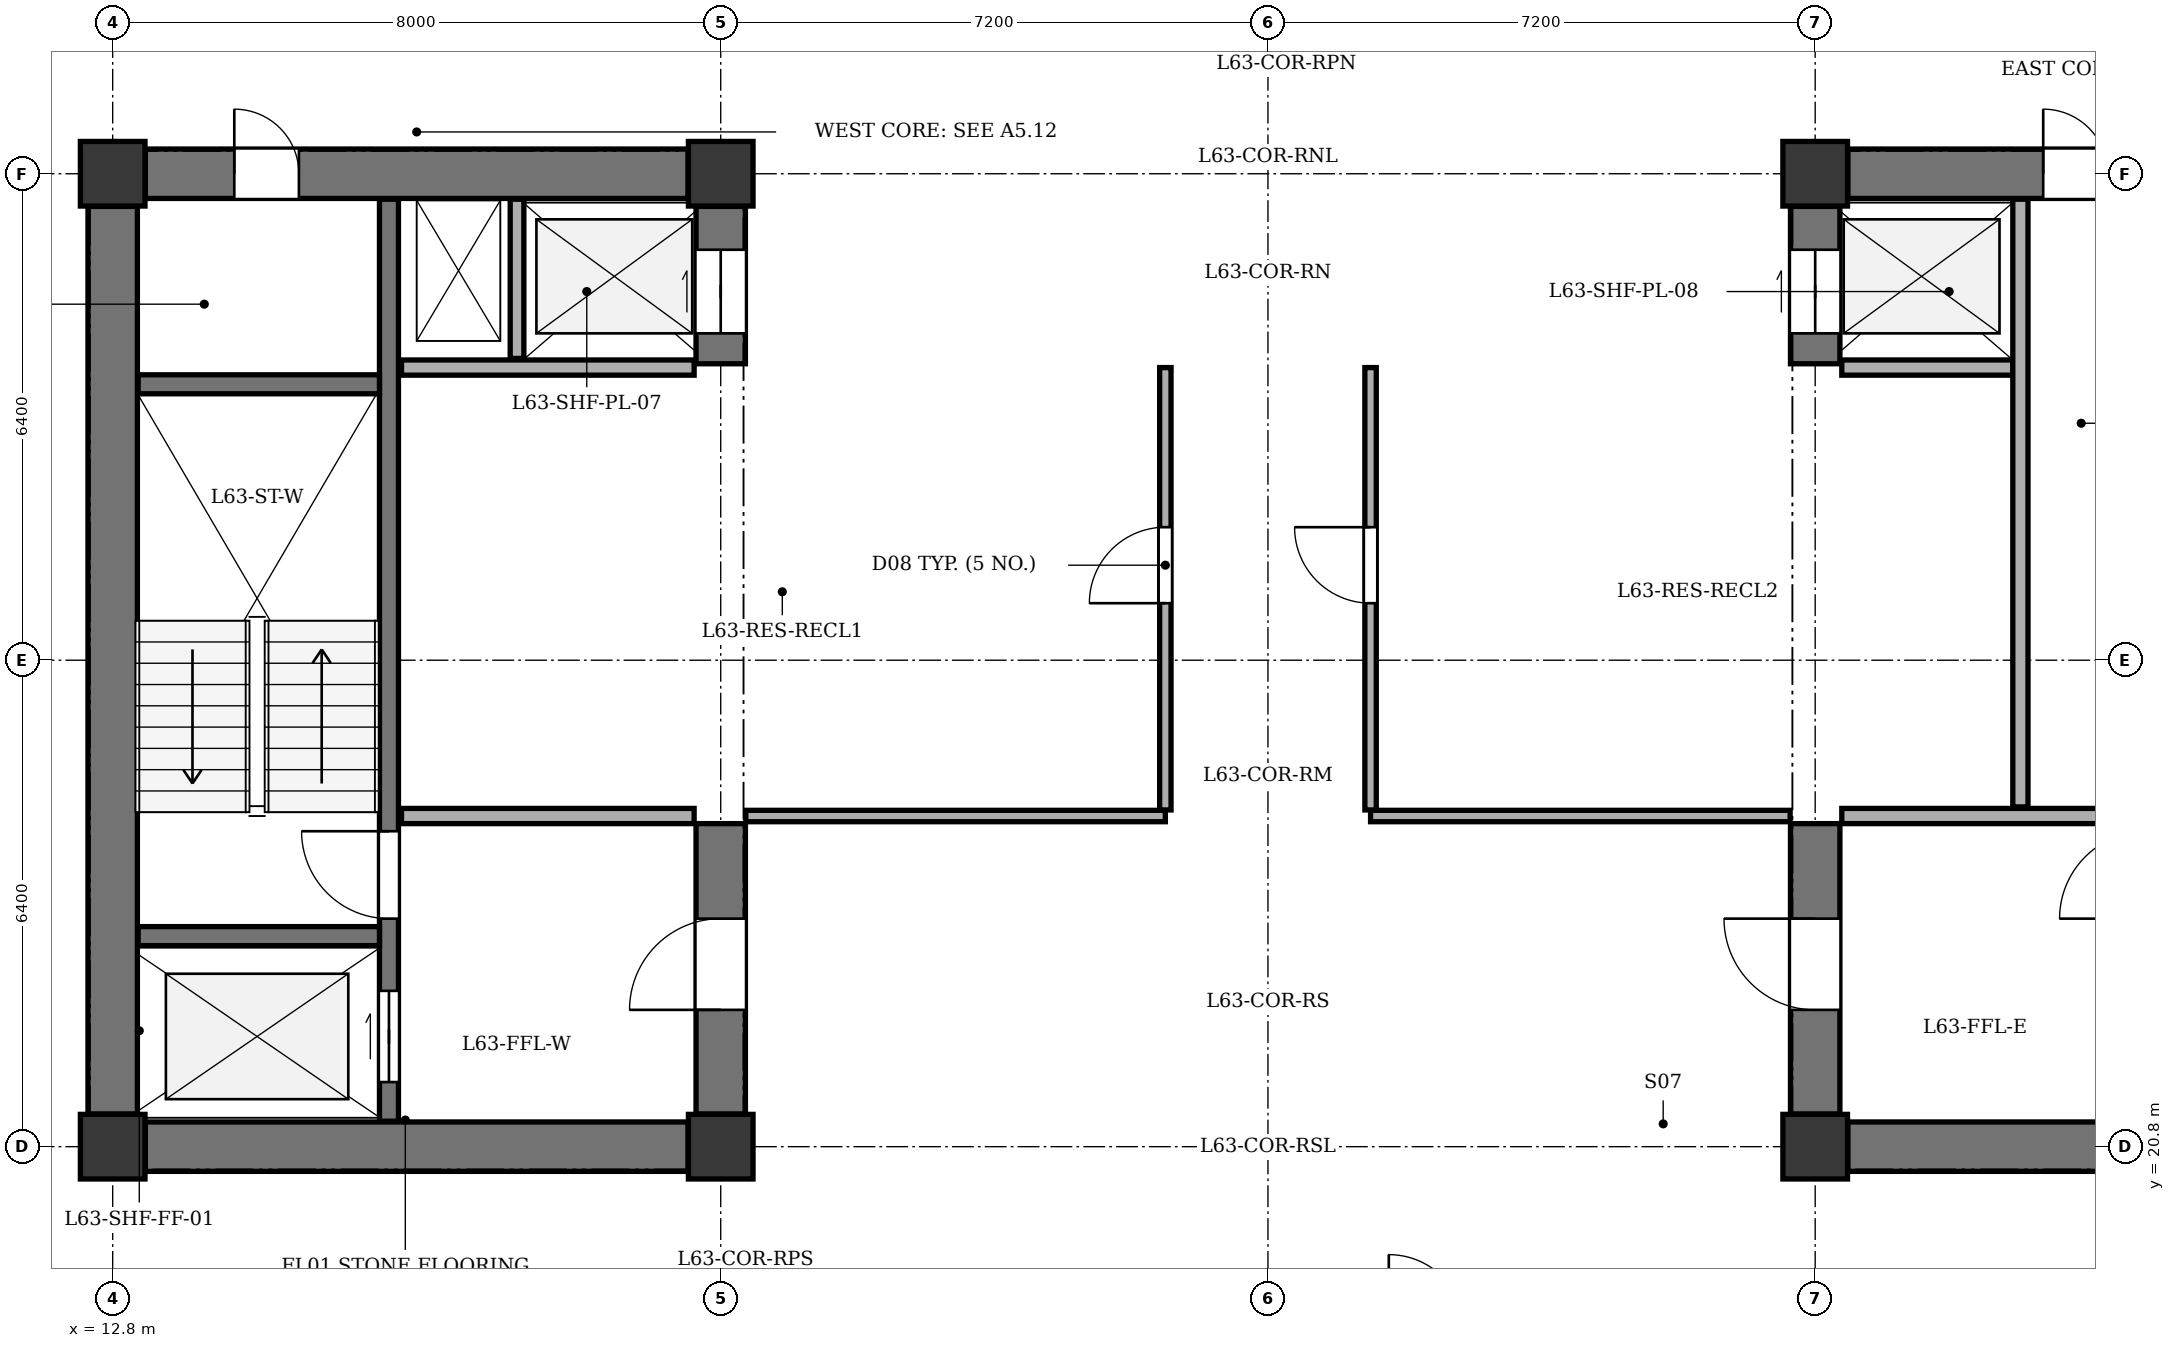
"""IFC4 building model, lengths in metres.
Left out: names, types, materials, properties, quantities, classifications, styles, units other than length and angle.
Written with IfcOpenShell. Run it as: python <this file> out.ifc"""

import sys

from ifc_helpers import new_model, si_unit, direction, frame, frame_2d, origin, origin_2d, place, context, subcontext, project, spatial, rectangle, extrude, element, fill, save


model = new_model("IFC4")
c1 = context("Model", 3, precision=1e-05, world=origin(), true_north=direction((0.0, 1.0)))
c2 = subcontext(c1, "Body", "Model", "MODEL_VIEW")
j1 = project(units=[si_unit("LENGTHUNIT", "METRE"), si_unit("PLANEANGLEUNIT", "RADIAN")], contexts=[c1])
p1 = place(None, origin())
s1 = spatial("IfcSite", under=j1, at=p1, CompositionType="ELEMENT")
p2 = place(p1, origin())
s2 = spatial("IfcBuilding", under=s1, at=p2, CompositionType="ELEMENT")
p3 = place(p2, frame((0.0, 0.0, 241.5)))
s3 = spatial("IfcBuildingStorey", under=s2, at=p3, CompositionType="ELEMENT", Elevation=241.5)
for number, where, z_axis, x_axis in (
    (1, (12.8, 20.8, 0.0), (0.0, 0.0, 1.0), (1.0, 0.0, 0.0)),
    (2, (20.8, 20.8, 0.0), (0.0, 0.0, 1.0), (1.0, 0.0, 0.0)),
    (3, (12.8, 33.6, 0.0), (0.0, 0.0, 1.0), (1.0, 0.0, 0.0)),
    (4, (20.8, 33.6, 0.0), (0.0, 0.0, 1.0), (1.0, 0.0, 0.0)),
    (5, (35.2, 20.8, 0.0), (0.0, 0.0, 1.0), (1.0, 0.0, 0.0)),
    (6, (35.2, 33.6, 0.0), (0.0, 0.0, 1.0), (1.0, 0.0, 0.0)),
):
    element("IfcColumn", number, at=place(p3, frame(where, z_axis=z_axis, x_axis=x_axis)), inside=s3, PredefinedType="COLUMN", context=c2, shape_type="SweptSolid", body=[
        extrude(rectangle(XDim=0.85, YDim=0.85, at=origin_2d()), origin(), (0.0, 0.0, 1.0), 3.4),
    ])
p4 = place(p3, frame((10.88, 35.0, 0.0), z_axis=(0.0, 0.0, 1.0), x_axis=(0.707106781187, 0.707106781187, 0.0)))
e7 = element("IfcWall", 7, at=p4, inside=s3, PredefinedType="STANDARD", context=c2, shape_type="SweptSolid", body=[
    extrude(rectangle(XDim=6.11, YDim=0.32, at=frame_2d((3.055, 0.0))), origin(), (0.0, 0.0, 1.0), 2.725),
])
p5 = place(p4, frame((2.355, 0.0, 0.75)))
e8 = element("IfcOpeningElement", 8, at=p5, cuts=e7, PredefinedType="OPENING", context=c2, shape_type="SweptSolid", body=[
    extrude(rectangle(XDim=1.4, YDim=1.65, at=frame_2d((0.7, 0.825))), frame((0.0, 0.17, 0.0), z_axis=(0.0, -1.0, 0.0), x_axis=(1.0, 0.0, 0.0)), (0.0, 0.0, 1.0), 0.34),
])
p6 = place(p3, frame((12.8, 21.23, 0.0), z_axis=(0.0, 0.0, 1.0), x_axis=(0.0, 1.0, 0.0)))
e9 = element("IfcWall", 9, at=p6, inside=s3, PredefinedType="SHEAR", context=c2, shape_type="SweptSolid", body=[
    extrude(rectangle(XDim=11.94, YDim=0.65, at=frame_2d((5.97, 0.0))), origin(), (0.0, 0.0, 1.0), 3.1),
])
p7 = place(p3, frame((13.23, 20.8, 0.0), z_axis=(0.0, 0.0, 1.0), x_axis=(1.0, 0.0, 0.0)))
e10 = element("IfcWall", 10, at=p7, inside=s3, PredefinedType="SHEAR", context=c2, shape_type="SweptSolid", body=[
    extrude(rectangle(XDim=7.14, YDim=0.65, at=frame_2d((3.57, 0.0))), origin(), (0.0, 0.0, 1.0), 3.1),
])
p8 = place(p3, frame((13.23, 33.6, 0.0), z_axis=(0.0, 0.0, 1.0), x_axis=(1.0, 0.0, 0.0)))
e11 = element("IfcWall", 11, at=p8, inside=s3, PredefinedType="SHEAR", context=c2, shape_type="SweptSolid", body=[
    extrude(rectangle(XDim=7.14, YDim=0.65, at=frame_2d((3.57, 0.0))), origin(), (0.0, 0.0, 1.0), 3.1),
])
p9 = place(p8, frame((1.17, 0.0, 0.0)))
e12 = element("IfcOpeningElement", 12, at=p9, cuts=e11, PredefinedType="OPENING", context=c2, shape_type="SweptSolid", body=[
    extrude(rectangle(XDim=0.85, YDim=2.02, at=frame_2d((0.425, 1.01))), frame((0.0, 0.335, 0.0), z_axis=(0.0, -1.0, 0.0), x_axis=(1.0, 0.0, 0.0)), (0.0, 0.0, 1.0), 0.67),
])
p10 = place(p3, frame((20.8, 21.23, 0.0), z_axis=(0.0, 0.0, 1.0), x_axis=(0.0, 1.0, 0.0)))
e13 = element("IfcWall", 13, at=p10, inside=s3, PredefinedType="SHEAR", context=c2, shape_type="SweptSolid", body=[
    extrude(rectangle(XDim=3.82, YDim=0.65, at=frame_2d((1.91, 0.0))), origin(), (0.0, 0.0, 1.0), 3.1),
])
p11 = place(p10, frame((1.37, 0.0, 0.0)))
e14 = element("IfcOpeningElement", 14, at=p11, cuts=e13, PredefinedType="OPENING", context=c2, shape_type="SweptSolid", body=[
    extrude(rectangle(XDim=1.2, YDim=2.15, at=frame_2d((0.6, 1.075))), frame((0.0, 0.335, 0.0), z_axis=(0.0, -1.0, 0.0), x_axis=(1.0, 0.0, 0.0)), (0.0, 0.0, 1.0), 0.67),
])
p12 = place(p3, frame((20.8, 31.1, 0.0), z_axis=(0.0, 0.0, 1.0), x_axis=(0.0, 1.0, 0.0)))
e15 = element("IfcWall", 15, at=p12, inside=s3, PredefinedType="SHEAR", context=c2, shape_type="SweptSolid", body=[
    extrude(rectangle(XDim=2.07, YDim=0.65, at=frame_2d((1.035, 0.0))), origin(), (0.0, 0.0, 1.0), 3.1),
])
p13 = place(p12, frame((0.4, 0.0, 0.0)))
e16 = element("IfcOpeningElement", 16, at=p13, cuts=e15, PredefinedType="OPENING", context=c2, shape_type="SweptSolid", body=[
    extrude(rectangle(XDim=1.1, YDim=2.1, at=frame_2d((0.55, 1.05))), frame((0.0, 0.335, 0.0), z_axis=(0.0, -1.0, 0.0), x_axis=(1.0, 0.0, 0.0)), (0.0, 0.0, 1.0), 0.67),
])
p14 = place(p3, frame((16.435, 21.135, 0.0), z_axis=(0.0, 0.0, 1.0), x_axis=(0.0, 1.0, 0.0)))
e17 = element("IfcWall", 17, at=p14, inside=s3, PredefinedType="SHEAR", context=c2, shape_type="SweptSolid", body=[
    extrude(rectangle(XDim=12.13, YDim=0.25, at=frame_2d((6.065, 0.0))), origin(), (0.0, 0.0, 1.0), 3.1),
])
p15 = place(p14, frame((0.515, 0.0, 0.0)))
e18 = element("IfcOpeningElement", 18, at=p15, cuts=e17, PredefinedType="OPENING", context=c2, shape_type="SweptSolid", body=[
    extrude(rectangle(XDim=1.2, YDim=2.15, at=frame_2d((0.6, 1.075))), frame((0.0, 0.135, 0.0), z_axis=(0.0, -1.0, 0.0), x_axis=(1.0, 0.0, 0.0)), (0.0, 0.0, 1.0), 0.27),
])
p16 = place(p14, frame((2.665, 0.0, 0.0)))
e19 = element("IfcOpeningElement", 19, at=p16, cuts=e17, PredefinedType="OPENING", context=c2, shape_type="SweptSolid", body=[
    extrude(rectangle(XDim=1.15, YDim=2.15, at=frame_2d((0.575, 1.075))), frame((0.0, 0.135, 0.0), z_axis=(0.0, -1.0, 0.0), x_axis=(1.0, 0.0, 0.0)), (0.0, 0.0, 1.0), 0.27),
])
for number, where, z_axis, x_axis in (
    (20, (13.135, 23.57, 0.0), (0.0, 0.0, 1.0), (1.0, 0.0, 0.0)),
    (21, (13.135, 30.83, 0.0), (0.0, 0.0, 1.0), (1.0, 0.0, 0.0)),
):
    element("IfcWall", number, at=place(p3, frame(where, z_axis=z_axis, x_axis=x_axis)), inside=s3, PredefinedType="SHEAR", context=c2, shape_type="SweptSolid", body=[
        extrude(rectangle(XDim=3.175, YDim=0.25, at=frame_2d((1.587, 0.0))), origin(), (0.0, 0.0, 1.0), 3.1),
    ])
for number, where, z_axis, x_axis in (
    (22, (16.6, 25.15, 0.0), (0.0, 0.0, 1.0), (1.0, 0.0, 0.0)),
    (23, (16.6, 31.05, 0.0), (0.0, 0.0, 1.0), (1.0, 0.0, 0.0)),
):
    element("IfcWall", number, at=place(p3, frame(where, z_axis=z_axis, x_axis=x_axis)), inside=s3, PredefinedType="SOLIDWALL", context=c2, shape_type="SweptSolid", body=[
        extrude(rectangle(XDim=3.85, YDim=0.2, at=frame_2d((1.925, 0.0))), origin(), (0.0, 0.0, 1.0), 3.1),
    ])
p17 = place(p3, frame((18.12, 31.17, 0.0), z_axis=(0.0, 0.0, 1.0), x_axis=(0.0, 1.0, 0.0)))
e24 = element("IfcWall", 24, at=p17, inside=s3, PredefinedType="PARTITIONING", context=c2, shape_type="SweptSolid", body=[
    extrude(rectangle(XDim=2.095, YDim=0.18, at=frame_2d((1.047, 0.0))), origin(), (0.0, 0.0, 1.0), 3.1),
])
p18 = place(p3, frame((35.63, 20.8, 0.0), z_axis=(0.0, 0.0, 1.0), x_axis=(1.0, 0.0, 0.0)))
e25 = element("IfcWall", 25, at=p18, inside=s3, PredefinedType="SHEAR", context=c2, shape_type="SweptSolid", body=[
    extrude(rectangle(XDim=7.14, YDim=0.65, at=frame_2d((3.57, 0.0))), origin(), (0.0, 0.0, 1.0), 3.1),
])
p19 = place(p3, frame((35.63, 33.6, 0.0), z_axis=(0.0, 0.0, 1.0), x_axis=(1.0, 0.0, 0.0)))
e26 = element("IfcWall", 26, at=p19, inside=s3, PredefinedType="SHEAR", context=c2, shape_type="SweptSolid", body=[
    extrude(rectangle(XDim=7.14, YDim=0.65, at=frame_2d((3.57, 0.0))), origin(), (0.0, 0.0, 1.0), 3.1),
])
p20 = place(p19, frame((4.77, 0.0, 0.0)))
e27 = element("IfcOpeningElement", 27, at=p20, cuts=e26, PredefinedType="OPENING", context=c2, shape_type="SweptSolid", body=[
    extrude(rectangle(XDim=1.3, YDim=2.15, at=frame_2d((0.65, 1.075))), frame((0.0, 0.335, 0.0), z_axis=(0.0, -1.0, 0.0), x_axis=(1.0, 0.0, 0.0)), (0.0, 0.0, 1.0), 0.67),
])
p21 = place(p19, frame((2.57, 0.0, 0.0)))
e28 = element("IfcOpeningElement", 28, at=p21, cuts=e26, PredefinedType="OPENING", context=c2, shape_type="SweptSolid", body=[
    extrude(rectangle(XDim=0.85, YDim=2.02, at=frame_2d((0.425, 1.01))), frame((0.0, 0.335, 0.0), z_axis=(0.0, -1.0, 0.0), x_axis=(1.0, 0.0, 0.0)), (0.0, 0.0, 1.0), 0.67),
])
p22 = place(p3, frame((35.2, 21.23, 0.0), z_axis=(0.0, 0.0, 1.0), x_axis=(0.0, 1.0, 0.0)))
e29 = element("IfcWall", 29, at=p22, inside=s3, PredefinedType="SHEAR", context=c2, shape_type="SweptSolid", body=[
    extrude(rectangle(XDim=3.82, YDim=0.65, at=frame_2d((1.91, 0.0))), origin(), (0.0, 0.0, 1.0), 3.1),
])
p23 = place(p22, frame((1.37, 0.0, 0.0)))
e30 = element("IfcOpeningElement", 30, at=p23, cuts=e29, PredefinedType="OPENING", context=c2, shape_type="SweptSolid", body=[
    extrude(rectangle(XDim=1.2, YDim=2.15, at=frame_2d((0.6, 1.075))), frame((0.0, 0.335, 0.0), z_axis=(0.0, -1.0, 0.0), x_axis=(1.0, 0.0, 0.0)), (0.0, 0.0, 1.0), 0.67),
])
p24 = place(p3, frame((35.2, 31.1, 0.0), z_axis=(0.0, 0.0, 1.0), x_axis=(0.0, 1.0, 0.0)))
e31 = element("IfcWall", 31, at=p24, inside=s3, PredefinedType="SHEAR", context=c2, shape_type="SweptSolid", body=[
    extrude(rectangle(XDim=2.07, YDim=0.65, at=frame_2d((1.035, 0.0))), origin(), (0.0, 0.0, 1.0), 3.1),
])
p25 = place(p24, frame((0.4, 0.0, 0.0)))
e32 = element("IfcOpeningElement", 32, at=p25, cuts=e31, PredefinedType="OPENING", context=c2, shape_type="SweptSolid", body=[
    extrude(rectangle(XDim=1.1, YDim=2.1, at=frame_2d((0.55, 1.05))), frame((0.0, 0.335, 0.0), z_axis=(0.0, -1.0, 0.0), x_axis=(1.0, 0.0, 0.0)), (0.0, 0.0, 1.0), 0.67),
])
p26 = place(p3, frame((35.55, 25.15, 0.0), z_axis=(0.0, 0.0, 1.0), x_axis=(1.0, 0.0, 0.0)))
e33 = element("IfcWall", 33, at=p26, inside=s3, PredefinedType="SOLIDWALL", context=c2, shape_type="SweptSolid", body=[
    extrude(rectangle(XDim=3.85, YDim=0.2, at=frame_2d((1.925, 0.0))), origin(), (0.0, 0.0, 1.0), 3.1),
])
p27 = place(p3, frame((35.55, 31.05, 0.0), z_axis=(0.0, 0.0, 1.0), x_axis=(1.0, 0.0, 0.0)))
e34 = element("IfcWall", 34, at=p27, inside=s3, PredefinedType="SOLIDWALL", context=c2, shape_type="SweptSolid", body=[
    extrude(rectangle(XDim=2.25, YDim=0.2, at=frame_2d((1.125, 0.0))), origin(), (0.0, 0.0, 1.0), 3.1),
])
p28 = place(p3, frame((37.9, 25.27, 0.0), z_axis=(0.0, 0.0, 1.0), x_axis=(0.0, 1.0, 0.0)))
e35 = element("IfcWall", 35, at=p28, inside=s3, PredefinedType="SOLIDWALL", context=c2, shape_type="SweptSolid", body=[
    extrude(rectangle(XDim=7.995, YDim=0.2, at=frame_2d((3.998, 0.0))), origin(), (0.0, 0.0, 1.0), 3.1),
])
for number, where, z_axis, x_axis in (
    (36, (21.13, 25.15, 0.0), (0.0, 0.0, 1.0), (1.0, 0.0, 0.0)),
    (37, (29.35, 25.15, 0.0), (0.0, 0.0, 1.0), (1.0, 0.0, 0.0)),
):
    element("IfcWall", number, at=place(p3, frame(where, z_axis=z_axis, x_axis=x_axis)), inside=s3, PredefinedType="PARTITIONING", context=c2, shape_type="SweptSolid", body=[
        extrude(rectangle(XDim=5.52, YDim=0.15, at=frame_2d((2.76, 0.0))), origin(), (0.0, 0.0, 1.0), 3.1),
    ])
p29 = place(p3, frame((26.65, 25.23, 0.0), z_axis=(0.0, 0.0, 1.0), x_axis=(0.0, 1.0, 0.0)))
e38 = element("IfcWall", 38, at=p29, inside=s3, PredefinedType="PARTITIONING", context=c2, shape_type="SweptSolid", body=[
    extrude(rectangle(XDim=5.82, YDim=0.15, at=frame_2d((2.91, 0.0))), origin(), (0.0, 0.0, 1.0), 3.1),
])
p30 = place(p29, frame((2.72, 0.0, 0.0)))
e39 = element("IfcOpeningElement", 39, at=p30, cuts=e38, PredefinedType="OPENING", context=c2, shape_type="SweptSolid", body=[
    extrude(rectangle(XDim=1.0, YDim=2.1, at=frame_2d((0.5, 1.05))), frame((0.0, 0.085, 0.0), z_axis=(0.0, -1.0, 0.0), x_axis=(1.0, 0.0, 0.0)), (0.0, 0.0, 1.0), 0.17),
])
p31 = place(p3, frame((29.35, 25.23, 0.0), z_axis=(0.0, 0.0, 1.0), x_axis=(0.0, 1.0, 0.0)))
e40 = element("IfcWall", 40, at=p31, inside=s3, PredefinedType="PARTITIONING", context=c2, shape_type="SweptSolid", body=[
    extrude(rectangle(XDim=5.82, YDim=0.15, at=frame_2d((2.91, 0.0))), origin(), (0.0, 0.0, 1.0), 3.1),
])
p32 = place(p31, frame((2.72, 0.0, 0.0)))
e41 = element("IfcOpeningElement", 41, at=p32, cuts=e40, PredefinedType="OPENING", context=c2, shape_type="SweptSolid", body=[
    extrude(rectangle(XDim=1.0, YDim=2.1, at=frame_2d((0.5, 1.05))), frame((0.0, 0.085, 0.0), z_axis=(0.0, -1.0, 0.0), x_axis=(1.0, 0.0, 0.0)), (0.0, 0.0, 1.0), 0.17),
])
p33 = place(p9, origin())
e42 = element("IfcDoor", 42, at=p33, inside=s3, OperationType="SINGLE_SWING_LEFT", PredefinedType="DOOR", context=c2, shape_type="SweptSolid", body=[
    extrude(rectangle(XDim=0.85, YDim=2.02, at=frame_2d((0.425, 1.01))), frame((0.0, 0.025, 0.0), z_axis=(0.0, -1.0, 0.0), x_axis=(1.0, 0.0, 0.0)), (0.0, 0.0, 1.0), 0.05),
])
fill(e12, e42)
p34 = place(p11, origin())
e43 = element("IfcDoor", 43, at=p34, inside=s3, OperationType="SINGLE_SWING_LEFT", PredefinedType="DOOR", context=c2, shape_type="SweptSolid", body=[
    extrude(rectangle(XDim=1.2, YDim=2.15, at=frame_2d((0.6, 1.075))), frame((0.0, 0.025, 0.0), z_axis=(0.0, -1.0, 0.0), x_axis=(1.0, 0.0, 0.0)), (0.0, 0.0, 1.0), 0.05),
])
fill(e14, e43)
p35 = place(p13, origin())
e44 = element("IfcDoor", 44, at=p35, inside=s3, OperationType="DOUBLE_DOOR_SLIDING", PredefinedType="DOOR", context=c2, shape_type="SweptSolid", body=[
    extrude(rectangle(XDim=1.1, YDim=2.1, at=frame_2d((0.55, 1.05))), frame((0.0, 0.025, 0.0), z_axis=(0.0, -1.0, 0.0), x_axis=(1.0, 0.0, 0.0)), (0.0, 0.0, 1.0), 0.05),
])
fill(e16, e44)
p36 = place(p15, origin())
e45 = element("IfcDoor", 45, at=p36, inside=s3, OperationType="DOUBLE_DOOR_SLIDING", PredefinedType="DOOR", context=c2, shape_type="SweptSolid", body=[
    extrude(rectangle(XDim=1.2, YDim=2.15, at=frame_2d((0.6, 1.075))), frame((0.0, 0.025, 0.0), z_axis=(0.0, -1.0, 0.0), x_axis=(1.0, 0.0, 0.0)), (0.0, 0.0, 1.0), 0.05),
])
fill(e18, e45)
p37 = place(p16, origin())
e46 = element("IfcDoor", 46, at=p37, inside=s3, OperationType="SINGLE_SWING_RIGHT", PredefinedType="DOOR", context=c2, shape_type="SweptSolid", body=[
    extrude(rectangle(XDim=1.15, YDim=2.15, at=frame_2d((0.575, 1.075))), frame((0.0, 0.025, 0.0), z_axis=(0.0, -1.0, 0.0), x_axis=(1.0, 0.0, 0.0)), (0.0, 0.0, 1.0), 0.05),
])
fill(e19, e46)
p38 = place(p21, origin())
e47 = element("IfcDoor", 47, at=p38, inside=s3, OperationType="SINGLE_SWING_LEFT", PredefinedType="DOOR", context=c2, shape_type="SweptSolid", body=[
    extrude(rectangle(XDim=0.85, YDim=2.02, at=frame_2d((0.425, 1.01))), frame((0.0, 0.025, 0.0), z_axis=(0.0, -1.0, 0.0), x_axis=(1.0, 0.0, 0.0)), (0.0, 0.0, 1.0), 0.05),
])
fill(e28, e47)
p39 = place(p23, origin())
e48 = element("IfcDoor", 48, at=p39, inside=s3, OperationType="SINGLE_SWING_RIGHT", PredefinedType="DOOR", context=c2, shape_type="SweptSolid", body=[
    extrude(rectangle(XDim=1.2, YDim=2.15, at=frame_2d((0.6, 1.075))), frame((0.0, 0.025, 0.0), z_axis=(0.0, -1.0, 0.0), x_axis=(1.0, 0.0, 0.0)), (0.0, 0.0, 1.0), 0.05),
])
fill(e30, e48)
p40 = place(p25, origin())
e49 = element("IfcDoor", 49, at=p40, inside=s3, OperationType="DOUBLE_DOOR_SLIDING", PredefinedType="DOOR", context=c2, shape_type="SweptSolid", body=[
    extrude(rectangle(XDim=1.1, YDim=2.1, at=frame_2d((0.55, 1.05))), frame((0.0, 0.025, 0.0), z_axis=(0.0, -1.0, 0.0), x_axis=(1.0, 0.0, 0.0)), (0.0, 0.0, 1.0), 0.05),
])
fill(e32, e49)
p41 = place(p30, origin())
e50 = element("IfcDoor", 50, at=p41, inside=s3, OperationType="SINGLE_SWING_LEFT", PredefinedType="DOOR", context=c2, shape_type="SweptSolid", body=[
    extrude(rectangle(XDim=1.0, YDim=2.1, at=frame_2d((0.5, 1.05))), frame((0.0, 0.025, 0.0), z_axis=(0.0, -1.0, 0.0), x_axis=(1.0, 0.0, 0.0)), (0.0, 0.0, 1.0), 0.05),
])
fill(e39, e50)
p42 = place(p32, origin())
e51 = element("IfcDoor", 51, at=p42, inside=s3, OperationType="SINGLE_SWING_RIGHT", PredefinedType="DOOR", context=c2, shape_type="SweptSolid", body=[
    extrude(rectangle(XDim=1.0, YDim=2.1, at=frame_2d((0.5, 1.05))), frame((0.0, 0.025, 0.0), z_axis=(0.0, -1.0, 0.0), x_axis=(1.0, 0.0, 0.0)), (0.0, 0.0, 1.0), 0.05),
])
fill(e41, e51)
save(model, sys.argv[1])
